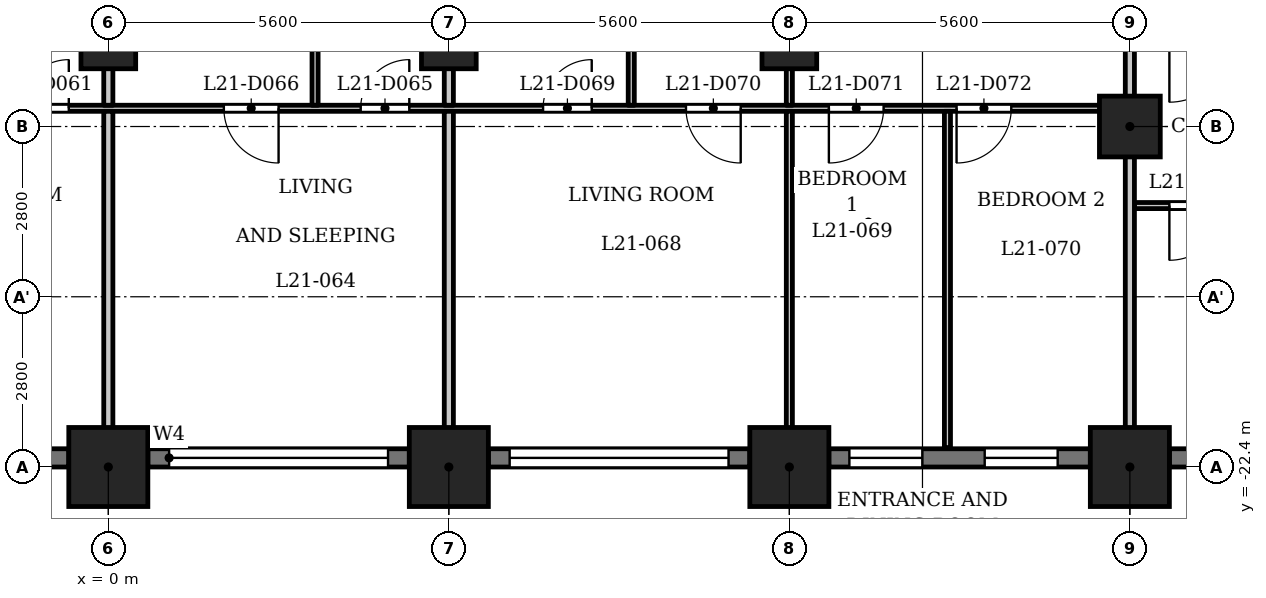
"""IFC4 building model, lengths in metres.
Left out: names, types, materials, properties, quantities, classifications, styles, units other than length and angle.
Written with IfcOpenShell. Run it as: python <this file> out.ifc"""

import sys

from ifc_helpers import new_model, si_unit, direction, frame, frame_2d, origin, origin_2d, place, context, subcontext, project, spatial, rectangle, extrude, element, fill, save


model = new_model("IFC4")
c1 = context("Model", 3, precision=1e-05, world=origin(), true_north=direction((0.0, 1.0)))
c2 = subcontext(c1, "Body", "Model", "MODEL_VIEW")
j1 = project(units=[si_unit("LENGTHUNIT", "METRE"), si_unit("PLANEANGLEUNIT", "RADIAN")], contexts=[c1])
p1 = place(None, origin())
s1 = spatial("IfcSite", under=j1, at=p1, CompositionType="ELEMENT")
p2 = place(p1, origin())
s2 = spatial("IfcBuilding", under=s1, at=p2, CompositionType="ELEMENT")
p3 = place(p2, frame((0.0, 0.0, 86.8)))
s3 = spatial("IfcBuildingStorey", under=s2, at=p3, CompositionType="ELEMENT", Elevation=86.8)
for number, where, z_axis, x_axis in (
    (1, (0.0, -22.4, 0.0), (0.0, 0.0, 1.0), (1.0, 0.0, 0.0)),
    (2, (5.6, -22.4, 0.0), (0.0, 0.0, 1.0), (1.0, 0.0, 0.0)),
    (3, (11.2, -22.4, 0.0), (0.0, 0.0, 1.0), (1.0, 0.0, 0.0)),
    (4, (16.8, -22.4, 0.0), (0.0, 0.0, 1.0), (1.0, 0.0, 0.0)),
):
    element("IfcColumn", number, at=place(p3, frame(where, z_axis=z_axis, x_axis=x_axis)), inside=s3, PredefinedType="COLUMN", context=c2, shape_type="SweptSolid", body=[
        extrude(rectangle(XDim=1.3, YDim=1.3, at=origin_2d()), origin(), (0.0, 0.0, 1.0), 3.5),
    ])
p4 = place(p3, frame((16.8, -16.8, 0.0), z_axis=(0.0, 0.0, 1.0), x_axis=(1.0, 0.0, 0.0)))
e5 = element("IfcColumn", 5, at=p4, inside=s3, PredefinedType="COLUMN", context=c2, shape_type="SweptSolid", body=[
    extrude(rectangle(XDim=1.0, YDim=1.0, at=origin_2d()), origin(), (0.0, 0.0, 1.0), 3.5),
])
for number, where, z_axis, x_axis in (
    (6, (0.0, -15.4, 0.0), (0.0, 0.0, 1.0), (1.0, 0.0, 0.0)),
    (7, (5.6, -15.4, 0.0), (0.0, 0.0, 1.0), (1.0, 0.0, 0.0)),
    (8, (11.2, -15.4, 0.0), (0.0, 0.0, 1.0), (1.0, 0.0, 0.0)),
):
    element("IfcColumn", number, at=place(p3, frame(where, z_axis=z_axis, x_axis=x_axis)), inside=s3, PredefinedType="COLUMN", context=c2, shape_type="SweptSolid", body=[
        extrude(rectangle(XDim=0.9, YDim=0.9, at=origin_2d()), origin(), (0.0, 0.0, 1.0), 3.5),
    ])
p5 = place(p3, frame((-4.95, -22.25, 0.0), z_axis=(0.0, 0.0, 1.0), x_axis=(1.0, 0.0, 0.0)))
e9 = element("IfcWall", 9, at=p5, inside=s3, PredefinedType="SOLIDWALL", context=c2, shape_type="SweptSolid", body=[
    extrude(rectangle(XDim=4.3, YDim=0.3, at=frame_2d((2.15, 0.0))), origin(), (0.0, 0.0, 1.0), 2.4),
])
p6 = place(p5, frame((0.337, 0.0, 0.6)))
e10 = element("IfcOpeningElement", 10, at=p6, cuts=e9, PredefinedType="OPENING", context=c2, shape_type="SweptSolid", body=[
    extrude(rectangle(XDim=1.2, YDim=1.55, at=frame_2d((0.6, 0.775))), frame((0.0, 0.16, 0.0), z_axis=(0.0, -1.0, 0.0), x_axis=(1.0, 0.0, 0.0)), (0.0, 0.0, 1.0), 0.32),
])
p7 = place(p5, frame((2.562, 0.0, 0.6)))
e11 = element("IfcOpeningElement", 11, at=p7, cuts=e9, PredefinedType="OPENING", context=c2, shape_type="SweptSolid", body=[
    extrude(rectangle(XDim=1.2, YDim=1.55, at=frame_2d((0.6, 0.775))), frame((0.0, 0.16, 0.0), z_axis=(0.0, -1.0, 0.0), x_axis=(1.0, 0.0, 0.0)), (0.0, 0.0, 1.0), 0.32),
])
p8 = place(p3, frame((0.65, -22.25, 0.0), z_axis=(0.0, 0.0, 1.0), x_axis=(1.0, 0.0, 0.0)))
e12 = element("IfcWall", 12, at=p8, inside=s3, PredefinedType="SOLIDWALL", context=c2, shape_type="SweptSolid", body=[
    extrude(rectangle(XDim=4.3, YDim=0.3, at=frame_2d((2.15, 0.0))), origin(), (0.0, 0.0, 1.0), 2.4),
])
p9 = place(p8, frame((0.35, 0.0, 1.2)))
e13 = element("IfcOpeningElement", 13, at=p9, cuts=e12, PredefinedType="OPENING", context=c2, shape_type="SweptSolid", body=[
    extrude(rectangle(XDim=3.6, YDim=0.95, at=frame_2d((1.8, 0.475))), frame((0.0, 0.16, 0.0), z_axis=(0.0, -1.0, 0.0), x_axis=(1.0, 0.0, 0.0)), (0.0, 0.0, 1.0), 0.32),
])
p10 = place(p3, frame((6.25, -22.25, 0.0), z_axis=(0.0, 0.0, 1.0), x_axis=(1.0, 0.0, 0.0)))
e14 = element("IfcWall", 14, at=p10, inside=s3, PredefinedType="SOLIDWALL", context=c2, shape_type="SweptSolid", body=[
    extrude(rectangle(XDim=4.3, YDim=0.3, at=frame_2d((2.15, 0.0))), origin(), (0.0, 0.0, 1.0), 2.4),
])
p11 = place(p10, frame((0.35, 0.0, 1.2)))
e15 = element("IfcOpeningElement", 15, at=p11, cuts=e14, PredefinedType="OPENING", context=c2, shape_type="SweptSolid", body=[
    extrude(rectangle(XDim=3.6, YDim=0.95, at=frame_2d((1.8, 0.475))), frame((0.0, 0.16, 0.0), z_axis=(0.0, -1.0, 0.0), x_axis=(1.0, 0.0, 0.0)), (0.0, 0.0, 1.0), 0.32),
])
p12 = place(p3, frame((11.85, -22.25, 0.0), z_axis=(0.0, 0.0, 1.0), x_axis=(1.0, 0.0, 0.0)))
e16 = element("IfcWall", 16, at=p12, inside=s3, PredefinedType="SOLIDWALL", context=c2, shape_type="SweptSolid", body=[
    extrude(rectangle(XDim=4.3, YDim=0.3, at=frame_2d((2.15, 0.0))), origin(), (0.0, 0.0, 1.0), 2.4),
])
p13 = place(p12, frame((0.337, 0.0, 0.6)))
e17 = element("IfcOpeningElement", 17, at=p13, cuts=e16, PredefinedType="OPENING", context=c2, shape_type="SweptSolid", body=[
    extrude(rectangle(XDim=1.2, YDim=1.55, at=frame_2d((0.6, 0.775))), frame((0.0, 0.16, 0.0), z_axis=(0.0, -1.0, 0.0), x_axis=(1.0, 0.0, 0.0)), (0.0, 0.0, 1.0), 0.32),
])
p14 = place(p12, frame((2.562, 0.0, 0.6)))
e18 = element("IfcOpeningElement", 18, at=p14, cuts=e16, PredefinedType="OPENING", context=c2, shape_type="SweptSolid", body=[
    extrude(rectangle(XDim=1.2, YDim=1.55, at=frame_2d((0.6, 0.775))), frame((0.0, 0.16, 0.0), z_axis=(0.0, -1.0, 0.0), x_axis=(1.0, 0.0, 0.0)), (0.0, 0.0, 1.0), 0.32),
])
p15 = place(p3, frame((17.45, -22.25, 0.0), z_axis=(0.0, 0.0, 1.0), x_axis=(1.0, 0.0, 0.0)))
e19 = element("IfcWall", 19, at=p15, inside=s3, PredefinedType="SOLIDWALL", context=c2, shape_type="SweptSolid", body=[
    extrude(rectangle(XDim=2.55, YDim=0.3, at=frame_2d((1.275, 0.0))), origin(), (0.0, 0.0, 1.0), 2.4),
])
p16 = place(p15, frame((0.675, 0.0, 0.6)))
e20 = element("IfcOpeningElement", 20, at=p16, cuts=e19, PredefinedType="OPENING", context=c2, shape_type="SweptSolid", body=[
    extrude(rectangle(XDim=1.2, YDim=1.55, at=frame_2d((0.6, 0.775))), frame((0.0, 0.16, 0.0), z_axis=(0.0, -1.0, 0.0), x_axis=(1.0, 0.0, 0.0)), (0.0, 0.0, 1.0), 0.32),
])
p17 = place(p3, frame((16.875, -18.1, 0.0), z_axis=(0.0, 0.0, 1.0), x_axis=(1.0, 0.0, 0.0)))
e21 = element("IfcWall", 21, at=p17, inside=s3, PredefinedType="PARTITIONING", context=c2, shape_type="SweptSolid", body=[
    extrude(rectangle(XDim=9.565, YDim=0.1, at=frame_2d((4.782, 0.0))), origin(), (0.0, 0.0, 1.0), 3.2),
])
p18 = place(p17, frame((6.139, 0.0, 0.0)))
e22 = element("IfcOpeningElement", 22, at=p18, cuts=e21, PredefinedType="OPENING", context=c2, shape_type="SweptSolid", body=[
    extrude(rectangle(XDim=0.8, YDim=2.1, at=frame_2d((0.4, 1.05))), frame((0.0, 0.06, 0.0), z_axis=(0.0, -1.0, 0.0), x_axis=(1.0, 0.0, 0.0)), (0.0, 0.0, 1.0), 0.12),
])
p19 = place(p17, frame((0.575, 0.0, 0.0)))
e23 = element("IfcOpeningElement", 23, at=p19, cuts=e21, PredefinedType="OPENING", context=c2, shape_type="SweptSolid", body=[
    extrude(rectangle(XDim=0.9, YDim=2.1, at=frame_2d((0.45, 1.05))), frame((0.0, 0.06, 0.0), z_axis=(0.0, -1.0, 0.0), x_axis=(1.0, 0.0, 0.0)), (0.0, 0.0, 1.0), 0.12),
])
p20 = place(p3, frame((-16.725, -16.5, 0.0), z_axis=(0.0, 0.0, 1.0), x_axis=(1.0, 0.0, 0.0)))
e24 = element("IfcWall", 24, at=p20, inside=s3, PredefinedType="PARTITIONING", context=c2, shape_type="SweptSolid", body=[
    extrude(rectangle(XDim=33.45, YDim=0.1, at=frame_2d((16.725, 0.0))), origin(), (0.0, 0.0, 1.0), 3.2),
])
p21 = place(p20, frame((3.825, 0.0, 0.0)))
e25 = element("IfcOpeningElement", 25, at=p21, cuts=e24, PredefinedType="OPENING", context=c2, shape_type="SweptSolid", body=[
    extrude(rectangle(XDim=0.8, YDim=2.1, at=frame_2d((0.4, 1.05))), frame((0.0, 0.06, 0.0), z_axis=(0.0, -1.0, 0.0), x_axis=(1.0, 0.0, 0.0)), (0.0, 0.0, 1.0), 0.12),
])
p22 = place(p20, frame((1.825, 0.0, 0.0)))
e26 = element("IfcOpeningElement", 26, at=p22, cuts=e24, PredefinedType="OPENING", context=c2, shape_type="SweptSolid", body=[
    extrude(rectangle(XDim=0.9, YDim=2.1, at=frame_2d((0.45, 1.05))), frame((0.0, 0.06, 0.0), z_axis=(0.0, -1.0, 0.0), x_axis=(1.0, 0.0, 0.0)), (0.0, 0.0, 1.0), 0.12),
])
p23 = place(p20, frame((9.675, 0.0, 0.0)))
e27 = element("IfcOpeningElement", 27, at=p23, cuts=e24, PredefinedType="OPENING", context=c2, shape_type="SweptSolid", body=[
    extrude(rectangle(XDim=0.8, YDim=2.1, at=frame_2d((0.4, 1.05))), frame((0.0, 0.06, 0.0), z_axis=(0.0, -1.0, 0.0), x_axis=(1.0, 0.0, 0.0)), (0.0, 0.0, 1.0), 0.12),
])
p24 = place(p20, frame((6.425, 0.0, 0.0)))
e28 = element("IfcOpeningElement", 28, at=p24, cuts=e24, PredefinedType="OPENING", context=c2, shape_type="SweptSolid", body=[
    extrude(rectangle(XDim=0.9, YDim=2.1, at=frame_2d((0.45, 1.05))), frame((0.0, 0.06, 0.0), z_axis=(0.0, -1.0, 0.0), x_axis=(1.0, 0.0, 0.0)), (0.0, 0.0, 1.0), 0.12),
])
p25 = place(p20, frame((15.275, 0.0, 0.0)))
e29 = element("IfcOpeningElement", 29, at=p25, cuts=e24, PredefinedType="OPENING", context=c2, shape_type="SweptSolid", body=[
    extrude(rectangle(XDim=0.8, YDim=2.1, at=frame_2d((0.4, 1.05))), frame((0.0, 0.06, 0.0), z_axis=(0.0, -1.0, 0.0), x_axis=(1.0, 0.0, 0.0)), (0.0, 0.0, 1.0), 0.12),
])
p26 = place(p20, frame((12.025, 0.0, 0.0)))
e30 = element("IfcOpeningElement", 30, at=p26, cuts=e24, PredefinedType="OPENING", context=c2, shape_type="SweptSolid", body=[
    extrude(rectangle(XDim=0.9, YDim=2.1, at=frame_2d((0.45, 1.05))), frame((0.0, 0.06, 0.0), z_axis=(0.0, -1.0, 0.0), x_axis=(1.0, 0.0, 0.0)), (0.0, 0.0, 1.0), 0.12),
])
p27 = place(p20, frame((20.875, 0.0, 0.0)))
e31 = element("IfcOpeningElement", 31, at=p27, cuts=e24, PredefinedType="OPENING", context=c2, shape_type="SweptSolid", body=[
    extrude(rectangle(XDim=0.8, YDim=2.1, at=frame_2d((0.4, 1.05))), frame((0.0, 0.06, 0.0), z_axis=(0.0, -1.0, 0.0), x_axis=(1.0, 0.0, 0.0)), (0.0, 0.0, 1.0), 0.12),
])
p28 = place(p20, frame((18.625, 0.0, 0.0)))
e32 = element("IfcOpeningElement", 32, at=p28, cuts=e24, PredefinedType="OPENING", context=c2, shape_type="SweptSolid", body=[
    extrude(rectangle(XDim=0.9, YDim=2.1, at=frame_2d((0.45, 1.05))), frame((0.0, 0.06, 0.0), z_axis=(0.0, -1.0, 0.0), x_axis=(1.0, 0.0, 0.0)), (0.0, 0.0, 1.0), 0.12),
])
p29 = place(p20, frame((23.875, 0.0, 0.0)))
e33 = element("IfcOpeningElement", 33, at=p29, cuts=e24, PredefinedType="OPENING", context=c2, shape_type="SweptSolid", body=[
    extrude(rectangle(XDim=0.8, YDim=2.1, at=frame_2d((0.4, 1.05))), frame((0.0, 0.06, 0.0), z_axis=(0.0, -1.0, 0.0), x_axis=(1.0, 0.0, 0.0)), (0.0, 0.0, 1.0), 0.12),
])
p30 = place(p20, frame((26.225, 0.0, 0.0)))
e34 = element("IfcOpeningElement", 34, at=p30, cuts=e24, PredefinedType="OPENING", context=c2, shape_type="SweptSolid", body=[
    extrude(rectangle(XDim=0.9, YDim=2.1, at=frame_2d((0.45, 1.05))), frame((0.0, 0.06, 0.0), z_axis=(0.0, -1.0, 0.0), x_axis=(1.0, 0.0, 0.0)), (0.0, 0.0, 1.0), 0.12),
])
p31 = place(p20, frame((28.575, 0.0, 0.0)))
e35 = element("IfcOpeningElement", 35, at=p31, cuts=e24, PredefinedType="OPENING", context=c2, shape_type="SweptSolid", body=[
    extrude(rectangle(XDim=0.9, YDim=2.1, at=frame_2d((0.45, 1.05))), frame((0.0, 0.06, 0.0), z_axis=(0.0, -1.0, 0.0), x_axis=(1.0, 0.0, 0.0)), (0.0, 0.0, 1.0), 0.12),
])
p32 = place(p20, frame((30.675, 0.0, 0.0)))
e36 = element("IfcOpeningElement", 36, at=p32, cuts=e24, PredefinedType="OPENING", context=c2, shape_type="SweptSolid", body=[
    extrude(rectangle(XDim=0.9, YDim=2.1, at=frame_2d((0.45, 1.05))), frame((0.0, 0.06, 0.0), z_axis=(0.0, -1.0, 0.0), x_axis=(1.0, 0.0, 0.0)), (0.0, 0.0, 1.0), 0.12),
])
p33 = place(p3, frame((0.0, -23.03, 0.0), z_axis=(0.0, 0.0, 1.0), x_axis=(0.0, 1.0, 0.0)))
e37 = element("IfcWall", 37, at=p33, inside=s3, PredefinedType="PARTITIONING", context=c2, shape_type="SweptSolid", body=[
    extrude(rectangle(XDim=6.48, YDim=0.15, at=frame_2d((3.24, 0.0))), origin(), (0.0, 0.0, 1.0), 3.2),
])
p34 = place(p3, frame((0.0, -16.45, 0.0), z_axis=(0.0, 0.0, 1.0), x_axis=(0.0, 1.0, 0.0)))
e38 = element("IfcWall", 38, at=p34, inside=s3, PredefinedType="PARTITIONING", context=c2, shape_type="SweptSolid", body=[
    extrude(rectangle(XDim=3.175, YDim=0.15, at=frame_2d((1.587, 0.0))), origin(), (0.0, 0.0, 1.0), 3.2),
])
p35 = place(p3, frame((3.4, -16.45, 0.0), z_axis=(0.0, 0.0, 1.0), x_axis=(0.0, 1.0, 0.0)))
e39 = element("IfcWall", 39, at=p35, inside=s3, PredefinedType="PARTITIONING", context=c2, shape_type="SweptSolid", body=[
    extrude(rectangle(XDim=3.175, YDim=0.1, at=frame_2d((1.587, 0.0))), origin(), (0.0, 0.0, 1.0), 3.2),
])
p36 = place(p3, frame((5.6, -23.03, 0.0), z_axis=(0.0, 0.0, 1.0), x_axis=(0.0, 1.0, 0.0)))
e40 = element("IfcWall", 40, at=p36, inside=s3, PredefinedType="PARTITIONING", context=c2, shape_type="SweptSolid", body=[
    extrude(rectangle(XDim=6.48, YDim=0.15, at=frame_2d((3.24, 0.0))), origin(), (0.0, 0.0, 1.0), 3.2),
])
p37 = place(p3, frame((5.6, -16.45, 0.0), z_axis=(0.0, 0.0, 1.0), x_axis=(0.0, 1.0, 0.0)))
e41 = element("IfcWall", 41, at=p37, inside=s3, PredefinedType="PARTITIONING", context=c2, shape_type="SweptSolid", body=[
    extrude(rectangle(XDim=3.175, YDim=0.15, at=frame_2d((1.587, 0.0))), origin(), (0.0, 0.0, 1.0), 3.2),
])
p38 = place(p3, frame((8.6, -16.45, 0.0), z_axis=(0.0, 0.0, 1.0), x_axis=(0.0, 1.0, 0.0)))
e42 = element("IfcWall", 42, at=p38, inside=s3, PredefinedType="PARTITIONING", context=c2, shape_type="SweptSolid", body=[
    extrude(rectangle(XDim=3.175, YDim=0.1, at=frame_2d((1.587, 0.0))), origin(), (0.0, 0.0, 1.0), 3.2),
])
p39 = place(p3, frame((11.2, -23.03, 0.0), z_axis=(0.0, 0.0, 1.0), x_axis=(0.0, 1.0, 0.0)))
e43 = element("IfcWall", 43, at=p39, inside=s3, PredefinedType="PARTITIONING", context=c2, shape_type="SweptSolid", body=[
    extrude(rectangle(XDim=6.48, YDim=0.1, at=frame_2d((3.24, 0.0))), origin(), (0.0, 0.0, 1.0), 3.2),
])
p40 = place(p3, frame((11.2, -16.45, 0.0), z_axis=(0.0, 0.0, 1.0), x_axis=(0.0, 1.0, 0.0)))
e44 = element("IfcWall", 44, at=p40, inside=s3, PredefinedType="PARTITIONING", context=c2, shape_type="SweptSolid", body=[
    extrude(rectangle(XDim=3.175, YDim=0.1, at=frame_2d((1.587, 0.0))), origin(), (0.0, 0.0, 1.0), 3.2),
])
p41 = place(p40, frame((1.699, 0.0, 0.0)))
e45 = element("IfcOpeningElement", 45, at=p41, cuts=e44, PredefinedType="OPENING", context=c2, shape_type="SweptSolid", body=[
    extrude(rectangle(XDim=0.9, YDim=2.1, at=frame_2d((0.45, 1.05))), frame((0.0, 0.06, 0.0), z_axis=(0.0, -1.0, 0.0), x_axis=(1.0, 0.0, 0.0)), (0.0, 0.0, 1.0), 0.12),
])
p42 = place(p3, frame((13.8, -22.08, 0.0), z_axis=(0.0, 0.0, 1.0), x_axis=(0.0, 1.0, 0.0)))
e46 = element("IfcWall", 46, at=p42, inside=s3, PredefinedType="PARTITIONING", context=c2, shape_type="SweptSolid", body=[
    extrude(rectangle(XDim=5.53, YDim=0.1, at=frame_2d((2.765, 0.0))), origin(), (0.0, 0.0, 1.0), 3.2),
])
p43 = place(p3, frame((16.8, -23.03, 0.0), z_axis=(0.0, 0.0, 1.0), x_axis=(0.0, 1.0, 0.0)))
e47 = element("IfcWall", 47, at=p43, inside=s3, PredefinedType="PARTITIONING", context=c2, shape_type="SweptSolid", body=[
    extrude(rectangle(XDim=7.555, YDim=0.15, at=frame_2d((3.777, 0.0))), origin(), (0.0, 0.0, 1.0), 3.2),
])
p44 = place(p25, origin())
e48 = element("IfcDoor", 48, at=p44, inside=s3, OperationType="SINGLE_SWING_LEFT", PredefinedType="DOOR", context=c2, shape_type="SweptSolid", body=[
    extrude(rectangle(XDim=0.8, YDim=2.1, at=frame_2d((0.4, 1.05))), frame((0.0, 0.025, 0.0), z_axis=(0.0, -1.0, 0.0), x_axis=(1.0, 0.0, 0.0)), (0.0, 0.0, 1.0), 0.05),
])
fill(e29, e48)
p45 = place(p27, origin())
e49 = element("IfcDoor", 49, at=p45, inside=s3, OperationType="SINGLE_SWING_LEFT", PredefinedType="DOOR", context=c2, shape_type="SweptSolid", body=[
    extrude(rectangle(XDim=0.8, YDim=2.1, at=frame_2d((0.4, 1.05))), frame((0.0, 0.025, 0.0), z_axis=(0.0, -1.0, 0.0), x_axis=(1.0, 0.0, 0.0)), (0.0, 0.0, 1.0), 0.05),
])
fill(e31, e49)
p46 = place(p28, origin())
e50 = element("IfcDoor", 50, at=p46, inside=s3, OperationType="SINGLE_SWING_RIGHT", PredefinedType="DOOR", context=c2, shape_type="SweptSolid", body=[
    extrude(rectangle(XDim=0.9, YDim=2.1, at=frame_2d((0.45, 1.05))), frame((0.0, 0.025, 0.0), z_axis=(0.0, -1.0, 0.0), x_axis=(1.0, 0.0, 0.0)), (0.0, 0.0, 1.0), 0.05),
])
fill(e32, e50)
p47 = place(p29, origin())
e51 = element("IfcDoor", 51, at=p47, inside=s3, OperationType="SINGLE_SWING_LEFT", PredefinedType="DOOR", context=c2, shape_type="SweptSolid", body=[
    extrude(rectangle(XDim=0.8, YDim=2.1, at=frame_2d((0.4, 1.05))), frame((0.0, 0.025, 0.0), z_axis=(0.0, -1.0, 0.0), x_axis=(1.0, 0.0, 0.0)), (0.0, 0.0, 1.0), 0.05),
])
fill(e33, e51)
p48 = place(p30, origin())
e52 = element("IfcDoor", 52, at=p48, inside=s3, OperationType="SINGLE_SWING_RIGHT", PredefinedType="DOOR", context=c2, shape_type="SweptSolid", body=[
    extrude(rectangle(XDim=0.9, YDim=2.1, at=frame_2d((0.45, 1.05))), frame((0.0, 0.025, 0.0), z_axis=(0.0, -1.0, 0.0), x_axis=(1.0, 0.0, 0.0)), (0.0, 0.0, 1.0), 0.05),
])
fill(e34, e52)
p49 = place(p31, origin())
e53 = element("IfcDoor", 53, at=p49, inside=s3, OperationType="SINGLE_SWING_LEFT", PredefinedType="DOOR", context=c2, shape_type="SweptSolid", body=[
    extrude(rectangle(XDim=0.9, YDim=2.1, at=frame_2d((0.45, 1.05))), frame((0.0, 0.025, 0.0), z_axis=(0.0, -1.0, 0.0), x_axis=(1.0, 0.0, 0.0)), (0.0, 0.0, 1.0), 0.05),
])
fill(e35, e53)
p50 = place(p32, origin())
e54 = element("IfcDoor", 54, at=p50, inside=s3, OperationType="SINGLE_SWING_LEFT", PredefinedType="DOOR", context=c2, shape_type="SweptSolid", body=[
    extrude(rectangle(XDim=0.9, YDim=2.1, at=frame_2d((0.45, 1.05))), frame((0.0, 0.025, 0.0), z_axis=(0.0, -1.0, 0.0), x_axis=(1.0, 0.0, 0.0)), (0.0, 0.0, 1.0), 0.05),
])
fill(e36, e54)
p51 = place(p19, origin())
e55 = element("IfcDoor", 55, at=p51, inside=s3, OperationType="SINGLE_SWING_LEFT", PredefinedType="DOOR", context=c2, shape_type="SweptSolid", body=[
    extrude(rectangle(XDim=0.9, YDim=2.1, at=frame_2d((0.45, 1.05))), frame((0.0, 0.025, 0.0), z_axis=(0.0, -1.0, 0.0), x_axis=(1.0, 0.0, 0.0)), (0.0, 0.0, 1.0), 0.05),
])
fill(e23, e55)
p52 = place(p9, origin())
e56 = element("IfcWindow", 56, at=p52, inside=s3, PartitioningType="SINGLE_PANEL", PredefinedType="WINDOW", context=c2, shape_type="SweptSolid", body=[
    extrude(rectangle(XDim=3.6, YDim=0.95, at=frame_2d((1.8, 0.475))), frame((0.0, 0.03, 0.0), z_axis=(0.0, -1.0, 0.0), x_axis=(1.0, 0.0, 0.0)), (0.0, 0.0, 1.0), 0.06),
])
fill(e13, e56)
p53 = place(p11, origin())
e57 = element("IfcWindow", 57, at=p53, inside=s3, PartitioningType="SINGLE_PANEL", PredefinedType="WINDOW", context=c2, shape_type="SweptSolid", body=[
    extrude(rectangle(XDim=3.6, YDim=0.95, at=frame_2d((1.8, 0.475))), frame((0.0, 0.03, 0.0), z_axis=(0.0, -1.0, 0.0), x_axis=(1.0, 0.0, 0.0)), (0.0, 0.0, 1.0), 0.06),
])
fill(e15, e57)
p54 = place(p13, origin())
e58 = element("IfcWindow", 58, at=p54, inside=s3, PartitioningType="SINGLE_PANEL", PredefinedType="WINDOW", context=c2, shape_type="SweptSolid", body=[
    extrude(rectangle(XDim=1.2, YDim=1.55, at=frame_2d((0.6, 0.775))), frame((0.0, 0.03, 0.0), z_axis=(0.0, -1.0, 0.0), x_axis=(1.0, 0.0, 0.0)), (0.0, 0.0, 1.0), 0.06),
])
fill(e17, e58)
p55 = place(p14, origin())
e59 = element("IfcWindow", 59, at=p55, inside=s3, PartitioningType="SINGLE_PANEL", PredefinedType="WINDOW", context=c2, shape_type="SweptSolid", body=[
    extrude(rectangle(XDim=1.2, YDim=1.55, at=frame_2d((0.6, 0.775))), frame((0.0, 0.03, 0.0), z_axis=(0.0, -1.0, 0.0), x_axis=(1.0, 0.0, 0.0)), (0.0, 0.0, 1.0), 0.06),
])
fill(e18, e59)
save(model, sys.argv[1])
